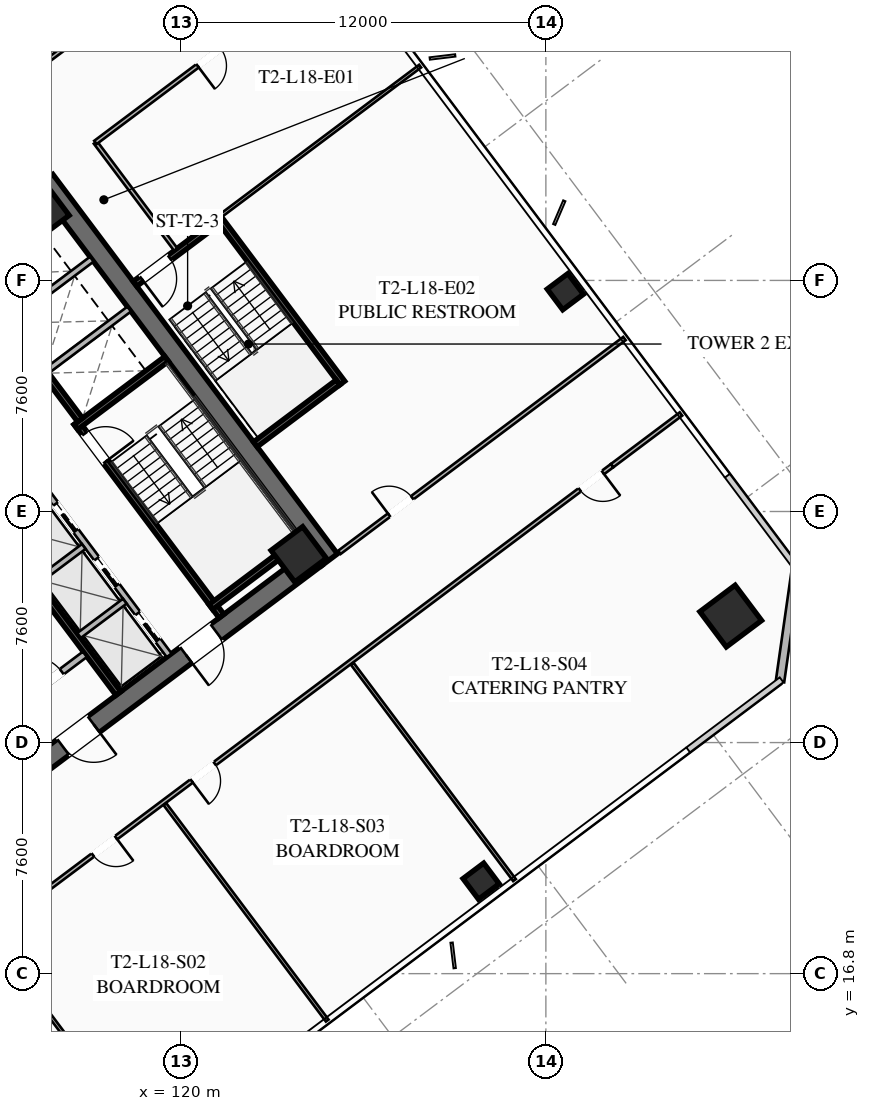
"""IFC4 building model, lengths in metres.
Left out: names, types, materials, properties, quantities, classifications, styles, units other than length and angle.
Written with IfcOpenShell. Run it as: python <this file> out.ifc"""

import sys

from ifc_helpers import new_model, si_unit, direction, frame, frame_2d, origin, origin_2d, place, context, subcontext, project, spatial, rectangle, hollow_rectangle, extrude, element, fill, save


model = new_model("IFC4")
c1 = context("Model", 3, precision=1e-05, world=origin(), true_north=direction((0.0, 1.0)))
c2 = subcontext(c1, "Body", "Model", "MODEL_VIEW")
j1 = project(units=[si_unit("LENGTHUNIT", "METRE"), si_unit("PLANEANGLEUNIT", "RADIAN")], contexts=[c1])
p1 = place(None, origin())
s1 = spatial("IfcSite", under=j1, at=p1, CompositionType="ELEMENT")
p2 = place(p1, origin())
s2 = spatial("IfcBuilding", under=s1, at=p2, CompositionType="ELEMENT")
p3 = place(p2, frame((0.0, 0.0, 70.75)))
s3 = spatial("IfcBuildingStorey", under=s2, at=p3, CompositionType="ELEMENT", Elevation=70.75)
p4 = place(p3, frame((115.524, 42.893, 0.0), z_axis=(0.0, 0.0, 1.0), x_axis=(0.600005007985, -0.799996243986, 0.0)))
e1 = element("IfcWall", 1, at=p4, inside=s3, PredefinedType="SHEAR", context=c2, shape_type="SweptSolid", body=[
    extrude(rectangle(XDim=15.6, YDim=0.65, at=frame_2d((7.8, 0.0))), origin(), (0.0, 0.0, 1.0), 3.55),
])
p5 = place(p3, frame((124.429, 30.478, 0.0), z_axis=(0.0, 0.0, 1.0), x_axis=(-0.799998028465, -0.600002628705, 0.0)))
e2 = element("IfcWall", 2, at=p5, inside=s3, PredefinedType="SHEAR", context=c2, shape_type="SweptSolid", body=[
    extrude(rectangle(XDim=14.86, YDim=0.65, at=frame_2d((7.43, 0.0))), origin(), (0.0, 0.0, 1.0), 3.55),
])
p6 = place(p5, frame((9.13, 0.0, 0.0)))
e3 = element("IfcOpeningElement", 3, at=p6, cuts=e2, PredefinedType="OPENING", context=c2, shape_type="SweptSolid", body=[
    extrude(rectangle(XDim=1.25, YDim=2.25, at=frame_2d((0.625, 1.125))), frame((0.0, 0.335, 0.0), z_axis=(0.0, -1.0, 0.0), x_axis=(1.0, 0.0, 0.0)), (0.0, 0.0, 1.0), 0.67),
])
p7 = place(p5, frame((4.08, 0.0, 0.0)))
e4 = element("IfcOpeningElement", 4, at=p7, cuts=e2, PredefinedType="OPENING", context=c2, shape_type="SweptSolid", body=[
    extrude(rectangle(XDim=1.25, YDim=2.25, at=frame_2d((0.625, 1.125))), frame((0.0, 0.335, 0.0), z_axis=(0.0, -1.0, 0.0), x_axis=(1.0, 0.0, 0.0)), (0.0, 0.0, 1.0), 0.67),
])
for number, where, z_axis, x_axis in (
    (5, (123.87, 30.59, 0.0), (0.0, 0.0, 1.0), (0.8, 0.6, 0.0)),
    (6, (115.41, 41.87, 0.0), (0.0, 0.0, 1.0), (0.8, 0.6, 0.0)),
):
    element("IfcColumn", number, at=place(p3, frame(where, z_axis=z_axis, x_axis=x_axis)), inside=s3, PredefinedType="COLUMN", context=c2, shape_type="SweptSolid", body=[
        extrude(hollow_rectangle(XDim=1.3, YDim=1.3, WallThickness=0.05, at=origin_2d()), origin(), (0.0, 0.0, 1.0), 3.35),
    ])
p8 = place(p3, frame((138.08, 28.56, 0.0), z_axis=(0.0, 0.0, 1.0), x_axis=(0.799999996291, 0.600000004945, 0.0)))
e7 = element("IfcColumn", 7, at=p8, inside=s3, PredefinedType="COLUMN", context=c2, shape_type="SweptSolid", body=[
    extrude(hollow_rectangle(XDim=1.45, YDim=1.45, WallThickness=0.055, at=origin_2d()), origin(), (0.0, 0.0, 1.0), 3.35),
])
for number, where, z_axis, x_axis in (
    (8, (129.87, 19.84, 0.0), (0.0, 0.0, 1.0), (0.8, 0.6, 0.0)),
    (9, (132.64, 39.23, 0.0), (0.0, 0.0, 1.0), (0.8, 0.6, 0.0)),
):
    element("IfcColumn", number, at=place(p3, frame(where, z_axis=z_axis, x_axis=x_axis)), inside=s3, PredefinedType="COLUMN", context=c2, shape_type="SweptSolid", body=[
        extrude(hollow_rectangle(XDim=0.85, YDim=0.85, WallThickness=0.035, at=origin_2d()), origin(), (0.0, 0.0, 1.0), 3.35),
    ])
p9 = place(p3, frame((140.24, 30.18, 0.0), z_axis=(0.0, 0.0, 1.0), x_axis=(-0.141430307517, -0.989948214866, 0.0)))
e10 = element("IfcWall", 10, at=p9, inside=s3, PredefinedType="SOLIDWALL", context=c2, shape_type="SweptSolid", body=[
    extrude(rectangle(XDim=3.818, YDim=0.28, at=frame_2d((1.909, 0.0))), origin(), (0.0, 0.0, 1.0), 3.35),
])
p10 = place(p3, frame((116.56, 34.92, 0.0), z_axis=(0.0, 0.0, 1.0), x_axis=(0.600009827119, -0.799992629566, 0.0)))
e11 = element("IfcWall", 11, at=p10, inside=s3, PredefinedType="SHEAR", context=c2, shape_type="SweptSolid", body=[
    extrude(rectangle(XDim=7.95, YDim=0.2, at=frame_2d((3.975, 0.0))), origin(), (0.0, 0.0, 1.0), 3.35),
])
p11 = place(p10, frame((0.45, 0.0, 0.0)))
e12 = element("IfcOpeningElement", 12, at=p11, cuts=e11, PredefinedType="OPENING", context=c2, shape_type="SweptSolid", body=[
    extrude(rectangle(XDim=1.15, YDim=2.2, at=frame_2d((0.575, 1.1))), frame((0.0, 0.11, 0.0), z_axis=(0.0, -1.0, 0.0), x_axis=(1.0, 0.0, 0.0)), (0.0, 0.0, 1.0), 0.22),
])
for number, where, z_axis, x_axis in (
    (13, (116.54, 34.78, 0.0), (0.0, 0.0, 1.0), (0.8, 0.6, 0.0)),
    (14, (120.98, 28.86, 0.0), (0.0, 0.0, 1.0), (0.8, 0.6, 0.0)),
):
    element("IfcWall", number, at=place(p3, frame(where, z_axis=z_axis, x_axis=x_axis)), inside=s3, PredefinedType="SHEAR", context=c2, shape_type="SweptSolid", body=[
        extrude(rectangle(XDim=3.73, YDim=0.2, at=frame_2d((1.865, 0.0))), origin(), (0.0, 0.0, 1.0), 3.35),
    ])
p12 = place(p3, frame((117.938, 26.016, 0.0), z_axis=(0.0, 0.0, 1.0), x_axis=(-0.600005463273, 0.799995902516, 0.0)))
e15 = element("IfcWall", 15, at=p12, inside=s3, PredefinedType="SHEAR", context=c2, shape_type="SweptSolid", body=[
    extrude(rectangle(XDim=14.3, YDim=0.2, at=frame_2d((7.15, 0.0))), origin(), (0.0, 0.0, 1.0), 3.35),
])
p13 = place(p3, frame((114.316, 25.412, 0.0), z_axis=(0.0, 0.0, 1.0), x_axis=(0.800018601094, 0.59997519774, 0.0)))
e16 = element("IfcWall", 16, at=p13, inside=s3, PredefinedType="SOLIDWALL", context=c2, shape_type="SweptSolid", body=[
    extrude(rectangle(XDim=3.15, YDim=0.22, at=frame_2d((1.575, 0.0))), origin(), (0.0, 0.0, 1.0), 2.703),
])
p14 = place(p13, frame((0.95, 0.0, 0.0)))
e17 = element("IfcOpeningElement", 17, at=p14, cuts=e16, PredefinedType="OPENING", context=c2, shape_type="SweptSolid", body=[
    extrude(rectangle(XDim=1.25, YDim=2.25, at=frame_2d((0.625, 1.125))), frame((0.0, 0.12, 0.0), z_axis=(0.0, -1.0, 0.0), x_axis=(1.0, 0.0, 0.0)), (0.0, 0.0, 1.0), 0.24),
])
p15 = place(p3, frame((112.87, 40.09, 0.0), z_axis=(0.0, 0.0, 1.0), x_axis=(0.599975393228, -0.800018454488, 0.0)))
e18 = element("IfcWall", 18, at=p15, inside=s3, PredefinedType="SHEAR", context=c2, shape_type="SweptSolid", body=[
    extrude(rectangle(XDim=6.35, YDim=0.2, at=frame_2d((3.175, 0.0))), origin(), (0.0, 0.0, 1.0), 3.35),
])
for number, where, z_axis, x_axis in (
    (19, (115.59, 36.63, 0.0), (0.0, 0.0, 1.0), (0.8, 0.6, 0.0)),
    (20, (114.36, 38.27, 0.0), (0.0, 0.0, 1.0), (0.8, 0.6, 0.0)),
):
    element("IfcWall", number, at=place(p3, frame(where, z_axis=z_axis, x_axis=x_axis)), inside=s3, PredefinedType="SOLIDWALL", context=c2, shape_type="SweptSolid", body=[
        extrude(rectangle(XDim=3.38, YDim=0.2, at=frame_2d((1.69, 0.0))), origin(), (0.0, 0.0, 1.0), 3.35),
    ])
p16 = place(p3, frame((119.61, 27.27, 0.0), z_axis=(0.0, 0.0, 1.0), x_axis=(-0.600011488909, 0.79999138319, 0.0)))
e21 = element("IfcWall", 21, at=p16, inside=s3, PredefinedType="SOLIDWALL", context=c2, shape_type="SweptSolid", body=[
    extrude(rectangle(XDim=6.8, YDim=0.2, at=frame_2d((3.4, 0.0))), origin(), (0.0, 0.0, 1.0), 3.35),
])
p17 = place(p16, frame((0.625, 0.0, 0.0)))
e22 = element("IfcOpeningElement", 22, at=p17, cuts=e21, PredefinedType="OPENING", context=c2, shape_type="SweptSolid", body=[
    extrude(rectangle(XDim=1.1, YDim=2.2, at=frame_2d((0.55, 1.1))), frame((0.0, 0.11, 0.0), z_axis=(0.0, -1.0, 0.0), x_axis=(1.0, 0.0, 0.0)), (0.0, 0.0, 1.0), 0.22),
])
p18 = place(p16, frame((2.875, 0.0, 0.0)))
e23 = element("IfcOpeningElement", 23, at=p18, cuts=e21, PredefinedType="OPENING", context=c2, shape_type="SweptSolid", body=[
    extrude(rectangle(XDim=1.1, YDim=2.2, at=frame_2d((0.55, 1.1))), frame((0.0, 0.11, 0.0), z_axis=(0.0, -1.0, 0.0), x_axis=(1.0, 0.0, 0.0)), (0.0, 0.0, 1.0), 0.22),
])
p19 = place(p16, frame((5.125, 0.0, 0.0)))
e24 = element("IfcOpeningElement", 24, at=p19, cuts=e21, PredefinedType="OPENING", context=c2, shape_type="SweptSolid", body=[
    extrude(rectangle(XDim=1.1, YDim=2.2, at=frame_2d((0.55, 1.1))), frame((0.0, 0.11, 0.0), z_axis=(0.0, -1.0, 0.0), x_axis=(1.0, 0.0, 0.0)), (0.0, 0.0, 1.0), 0.22),
])
p20 = place(p3, frame((116.646, 27.922, 0.0), z_axis=(0.0, 0.0, 1.0), x_axis=(0.8, 0.6, 0.0)))
e25 = element("IfcWall", 25, at=p20, inside=s3, PredefinedType="SOLIDWALL", context=c2, shape_type="SweptSolid", body=[
    extrude(rectangle(XDim=1.88, YDim=0.2, at=frame_2d((0.94, 0.0))), origin(), (0.0, 0.0, 1.0), 3.35),
])
p21 = place(p3, frame((115.296, 29.722, 0.0), z_axis=(0.0, 0.0, 1.0), x_axis=(0.799984418148, 0.600020775241, 0.0)))
e26 = element("IfcWall", 26, at=p21, inside=s3, PredefinedType="SOLIDWALL", context=c2, shape_type="SweptSolid", body=[
    extrude(rectangle(XDim=1.88, YDim=0.2, at=frame_2d((0.94, 0.0))), origin(), (0.0, 0.0, 1.0), 3.35),
])
p22 = place(p3, frame((125.304, 36.228, 0.0), z_axis=(0.0, 0.0, 1.0), x_axis=(-0.59998851072, 0.800008616831, 0.0)))
e27 = element("IfcWall", 27, at=p22, inside=s3, PredefinedType="SHEAR", context=c2, shape_type="SweptSolid", body=[
    extrude(rectangle(XDim=6.8, YDim=0.2, at=frame_2d((3.4, 0.0))), origin(), (0.0, 0.0, 1.0), 3.35),
])
p23 = place(p3, frame((121.204, 41.528, 0.0), z_axis=(0.0, 0.0, 1.0), x_axis=(-0.800017232136, -0.599977023131, 0.0)))
e28 = element("IfcWall", 28, at=p23, inside=s3, PredefinedType="SHEAR", context=c2, shape_type="SweptSolid", body=[
    extrude(rectangle(XDim=3.4, YDim=0.2, at=frame_2d((1.7, 0.0))), origin(), (0.0, 0.0, 1.0), 3.35),
])
p24 = place(p23, frame((1.975, 0.0, 0.0)))
e29 = element("IfcOpeningElement", 29, at=p24, cuts=e28, PredefinedType="OPENING", context=c2, shape_type="SweptSolid", body=[
    extrude(rectangle(XDim=1.15, YDim=2.2, at=frame_2d((0.575, 1.1))), frame((0.0, 0.11, 0.0), z_axis=(0.0, -1.0, 0.0), x_axis=(1.0, 0.0, 0.0)), (0.0, 0.0, 1.0), 0.22),
])
p25 = place(p3, frame((122.444, 34.208, 0.0), z_axis=(0.0, 0.0, 1.0), x_axis=(0.79999138319, 0.600011488909, 0.0)))
e30 = element("IfcWall", 30, at=p25, inside=s3, PredefinedType="SHEAR", context=c2, shape_type="SweptSolid", body=[
    extrude(rectangle(XDim=3.4, YDim=0.2, at=frame_2d((1.7, 0.0))), origin(), (0.0, 0.0, 1.0), 3.35),
])
p26 = place(p3, frame((119.824, 40.618, 0.0), z_axis=(0.0, 0.0, 1.0), x_axis=(-0.599982243973, 0.800013316712, 0.0)))
e31 = element("IfcWall", 31, at=p26, inside=s3, PredefinedType="PARTITIONING", context=c2, shape_type="SweptSolid", body=[
    extrude(rectangle(XDim=4.4, YDim=0.135, at=frame_2d((2.2, 0.0))), origin(), (0.0, 0.0, 1.0), 2.703),
])
p27 = place(p3, frame((98.516, 34.012, 0.0), z_axis=(0.0, 0.0, 1.0), x_axis=(0.8, 0.6, 0.0)))
e32 = element("IfcWall", 32, at=p27, inside=s3, PredefinedType="PARTITIONING", context=c2, shape_type="SweptSolid", body=[
    extrude(rectangle(XDim=28.23, YDim=0.135, at=frame_2d((14.115, 0.0))), origin(), (0.0, 0.0, 1.0), 2.703),
])
p28 = place(p27, frame((0.3, 0.0, 0.0)))
e33 = element("IfcOpeningElement", 33, at=p28, cuts=e32, PredefinedType="OPENING", context=c2, shape_type="SweptSolid", body=[
    extrude(rectangle(XDim=0.95, YDim=2.05, at=frame_2d((0.475, 1.025))), frame((0.0, 0.077, 0.0), z_axis=(0.0, -1.0, 0.0), x_axis=(1.0, 0.0, 0.0)), (0.0, 0.0, 1.0), 0.155),
])
p29 = place(p27, frame((6.84, 0.0, 0.0)))
e34 = element("IfcOpeningElement", 34, at=p29, cuts=e32, PredefinedType="OPENING", context=c2, shape_type="SweptSolid", body=[
    extrude(rectangle(XDim=0.95, YDim=2.05, at=frame_2d((0.475, 1.025))), frame((0.0, 0.077, 0.0), z_axis=(0.0, -1.0, 0.0), x_axis=(1.0, 0.0, 0.0)), (0.0, 0.0, 1.0), 0.155),
])
p30 = place(p27, frame((10.863, 0.0, 0.0)))
e35 = element("IfcOpeningElement", 35, at=p30, cuts=e32, PredefinedType="OPENING", context=c2, shape_type="SweptSolid", body=[
    extrude(rectangle(XDim=0.95, YDim=2.05, at=frame_2d((0.475, 1.025))), frame((0.0, 0.077, 0.0), z_axis=(0.0, -1.0, 0.0), x_axis=(1.0, 0.0, 0.0)), (0.0, 0.0, 1.0), 0.155),
])
p31 = place(p27, frame((26.98, 0.0, 0.0)))
e36 = element("IfcOpeningElement", 36, at=p31, cuts=e32, PredefinedType="OPENING", context=c2, shape_type="SweptSolid", body=[
    extrude(rectangle(XDim=0.95, YDim=2.05, at=frame_2d((0.475, 1.025))), frame((0.0, 0.077, 0.0), z_axis=(0.0, -1.0, 0.0), x_axis=(1.0, 0.0, 0.0)), (0.0, 0.0, 1.0), 0.155),
])
p32 = place(p3, frame((134.18, 33.51, 0.0), z_axis=(0.0, 0.0, 1.0), x_axis=(-0.8, -0.6, 0.0)))
e37 = element("IfcWall", 37, at=p32, inside=s3, PredefinedType="PARTITIONING", context=c2, shape_type="SweptSolid", body=[
    extrude(rectangle(XDim=28.23, YDim=0.135, at=frame_2d((14.115, 0.0))), origin(), (0.0, 0.0, 1.0), 2.703),
])
p33 = place(p32, frame((26.9, 0.0, 0.0)))
e38 = element("IfcOpeningElement", 38, at=p33, cuts=e37, PredefinedType="OPENING", context=c2, shape_type="SweptSolid", body=[
    extrude(rectangle(XDim=0.95, YDim=2.05, at=frame_2d((0.475, 1.025))), frame((0.0, 0.077, 0.0), z_axis=(0.0, -1.0, 0.0), x_axis=(1.0, 0.0, 0.0)), (0.0, 0.0, 1.0), 0.155),
])
p34 = place(p32, frame((20.399, 0.0, 0.0)))
e39 = element("IfcOpeningElement", 39, at=p34, cuts=e37, PredefinedType="OPENING", context=c2, shape_type="SweptSolid", body=[
    extrude(rectangle(XDim=0.95, YDim=2.05, at=frame_2d((0.475, 1.025))), frame((0.0, 0.077, 0.0), z_axis=(0.0, -1.0, 0.0), x_axis=(1.0, 0.0, 0.0)), (0.0, 0.0, 1.0), 0.155),
])
p35 = place(p32, frame((16.339, 0.0, 0.0)))
e40 = element("IfcOpeningElement", 40, at=p35, cuts=e37, PredefinedType="OPENING", context=c2, shape_type="SweptSolid", body=[
    extrude(rectangle(XDim=0.95, YDim=2.05, at=frame_2d((0.475, 1.025))), frame((0.0, 0.077, 0.0), z_axis=(0.0, -1.0, 0.0), x_axis=(1.0, 0.0, 0.0)), (0.0, 0.0, 1.0), 0.155),
])
p36 = place(p32, frame((0.38, 0.0, 0.0)))
e41 = element("IfcOpeningElement", 41, at=p36, cuts=e37, PredefinedType="OPENING", context=c2, shape_type="SweptSolid", body=[
    extrude(rectangle(XDim=0.95, YDim=2.05, at=frame_2d((0.475, 1.025))), frame((0.0, 0.077, 0.0), z_axis=(0.0, -1.0, 0.0), x_axis=(1.0, 0.0, 0.0)), (0.0, 0.0, 1.0), 0.155),
])
p37 = place(p3, frame((134.18, 33.51, 0.0), z_axis=(0.0, 0.0, 1.0), x_axis=(0.8000207031, 0.599972394874, 0.0)))
e42 = element("IfcWall", 42, at=p37, inside=s3, PredefinedType="PARTITIONING", context=c2, shape_type="SweptSolid", body=[
    extrude(rectangle(XDim=2.83, YDim=0.135, at=frame_2d((1.415, 0.0))), origin(), (0.0, 0.0, 1.0), 2.703),
])
for number, where, z_axis, x_axis in (
    (43, (119.048, 10.936, 0.0), (0.0, 0.0, 1.0), (-0.6, 0.8, 0.0)),
    (44, (124.808, 15.256, 0.0), (0.0, 0.0, 1.0), (-0.6, 0.8, 0.0)),
):
    element("IfcWall", number, at=place(p3, frame(where, z_axis=z_axis, x_axis=x_axis)), inside=s3, PredefinedType="PARTITIONING", context=c2, shape_type="SweptSolid", body=[
        extrude(rectangle(XDim=8.9, YDim=0.11, at=frame_2d((4.45, 0.0))), origin(), (0.0, 0.0, 1.0), 2.703),
    ])
p38 = place(p3, frame((130.968, 19.876, 0.0), z_axis=(0.0, 0.0, 1.0), x_axis=(-0.6, 0.8, 0.0)))
e45 = element("IfcWall", 45, at=p38, inside=s3, PredefinedType="PARTITIONING", context=c2, shape_type="SweptSolid", body=[
    extrude(rectangle(XDim=8.9, YDim=0.11, at=frame_2d((4.45, 0.0))), origin(), (0.0, 0.0, 1.0), 2.703),
])
p39 = place(p3, frame((125.224, 50.168, 0.0), z_axis=(0.0, 0.0, 1.0), x_axis=(-0.8, -0.6, 0.0)))
e46 = element("IfcWall", 46, at=p39, inside=s3, PredefinedType="PARTITIONING", context=c2, shape_type="SweptSolid", body=[
    extrude(rectangle(XDim=10.05, YDim=0.135, at=frame_2d((5.025, 0.0))), origin(), (0.0, 0.0, 1.0), 2.703),
])
p40 = place(p39, frame((4.9, 0.0, 0.0)))
e47 = element("IfcOpeningElement", 47, at=p40, cuts=e46, PredefinedType="OPENING", context=c2, shape_type="SweptSolid", body=[
    extrude(rectangle(XDim=0.95, YDim=2.05, at=frame_2d((0.475, 1.025))), frame((0.0, 0.077, 0.0), z_axis=(0.0, -1.0, 0.0), x_axis=(1.0, 0.0, 0.0)), (0.0, 0.0, 1.0), 0.155),
])
p41 = place(p3, frame((125.208, 30.656, 0.0), z_axis=(0.0, 0.0, 1.0), x_axis=(0.8, 0.6, 0.0)))
e48 = element("IfcWall", 48, at=p41, inside=s3, PredefinedType="PARTITIONING", context=c2, shape_type="SweptSolid", body=[
    extrude(rectangle(XDim=11.72, YDim=0.135, at=frame_2d((5.86, 0.0))), origin(), (0.0, 0.0, 1.0), 2.703),
])
p42 = place(p41, frame((2.045, 0.0, 0.0)))
e49 = element("IfcOpeningElement", 49, at=p42, cuts=e48, PredefinedType="OPENING", context=c2, shape_type="SweptSolid", body=[
    extrude(rectangle(XDim=0.95, YDim=2.05, at=frame_2d((0.475, 1.025))), frame((0.0, 0.077, 0.0), z_axis=(0.0, -1.0, 0.0), x_axis=(1.0, 0.0, 0.0)), (0.0, 0.0, 1.0), 0.155),
])
p43 = place(p3, frame((127.864, 46.648, 0.0), z_axis=(0.0, 0.0, 1.0), x_axis=(-0.800007145523, -0.599990472518, 0.0)))
e50 = element("IfcWall", 50, at=p43, inside=s3, PredefinedType="PARTITIONING", context=c2, shape_type="SweptSolid", body=[
    extrude(rectangle(XDim=8.2, YDim=0.11, at=frame_2d((4.1, 0.0))), origin(), (0.0, 0.0, 1.0), 2.703),
])
p44 = place(p6, origin())
e51 = element("IfcDoor", 51, at=p44, inside=s3, OperationType="SINGLE_SWING_LEFT", PredefinedType="DOOR", context=c2, shape_type="SweptSolid", body=[
    extrude(rectangle(XDim=1.25, YDim=2.25, at=frame_2d((0.625, 1.125))), frame((0.0, 0.025, 0.0), z_axis=(0.0, -1.0, 0.0), x_axis=(1.0, 0.0, 0.0)), (0.0, 0.0, 1.0), 0.05),
])
fill(e3, e51)
p45 = place(p7, origin())
e52 = element("IfcDoor", 52, at=p45, inside=s3, OperationType="SINGLE_SWING_RIGHT", PredefinedType="DOOR", context=c2, shape_type="SweptSolid", body=[
    extrude(rectangle(XDim=1.25, YDim=2.25, at=frame_2d((0.625, 1.125))), frame((0.0, 0.025, 0.0), z_axis=(0.0, -1.0, 0.0), x_axis=(1.0, 0.0, 0.0)), (0.0, 0.0, 1.0), 0.05),
])
fill(e4, e52)
p46 = place(p11, origin())
e53 = element("IfcDoor", 53, at=p46, inside=s3, OperationType="SINGLE_SWING_RIGHT", PredefinedType="DOOR", context=c2, shape_type="SweptSolid", body=[
    extrude(rectangle(XDim=1.15, YDim=2.2, at=frame_2d((0.575, 1.1))), frame((0.0, 0.025, 0.0), z_axis=(0.0, -1.0, 0.0), x_axis=(1.0, 0.0, 0.0)), (0.0, 0.0, 1.0), 0.05),
])
fill(e12, e53)
p47 = place(p14, origin())
e54 = element("IfcDoor", 54, at=p47, inside=s3, OperationType="SINGLE_SWING_LEFT", PredefinedType="DOOR", context=c2, shape_type="SweptSolid", body=[
    extrude(rectangle(XDim=1.25, YDim=2.25, at=frame_2d((0.625, 1.125))), frame((0.0, 0.025, 0.0), z_axis=(0.0, -1.0, 0.0), x_axis=(1.0, 0.0, 0.0)), (0.0, 0.0, 1.0), 0.05),
])
fill(e17, e54)
p48 = place(p24, origin())
e55 = element("IfcDoor", 55, at=p48, inside=s3, OperationType="SINGLE_SWING_RIGHT", PredefinedType="DOOR", context=c2, shape_type="SweptSolid", body=[
    extrude(rectangle(XDim=1.15, YDim=2.2, at=frame_2d((0.575, 1.1))), frame((0.0, 0.025, 0.0), z_axis=(0.0, -1.0, 0.0), x_axis=(1.0, 0.0, 0.0)), (0.0, 0.0, 1.0), 0.05),
])
fill(e29, e55)
p49 = place(p34, origin())
e56 = element("IfcDoor", 56, at=p49, inside=s3, OperationType="SINGLE_SWING_LEFT", PredefinedType="DOOR", context=c2, shape_type="SweptSolid", body=[
    extrude(rectangle(XDim=0.95, YDim=2.05, at=frame_2d((0.475, 1.025))), frame((0.0, 0.025, 0.0), z_axis=(0.0, -1.0, 0.0), x_axis=(1.0, 0.0, 0.0)), (0.0, 0.0, 1.0), 0.05),
])
fill(e39, e56)
p50 = place(p35, origin())
e57 = element("IfcDoor", 57, at=p50, inside=s3, OperationType="SINGLE_SWING_RIGHT", PredefinedType="DOOR", context=c2, shape_type="SweptSolid", body=[
    extrude(rectangle(XDim=0.95, YDim=2.05, at=frame_2d((0.475, 1.025))), frame((0.0, 0.025, 0.0), z_axis=(0.0, -1.0, 0.0), x_axis=(1.0, 0.0, 0.0)), (0.0, 0.0, 1.0), 0.05),
])
fill(e40, e57)
p51 = place(p36, origin())
e58 = element("IfcDoor", 58, at=p51, inside=s3, OperationType="SINGLE_SWING_LEFT", PredefinedType="DOOR", context=c2, shape_type="SweptSolid", body=[
    extrude(rectangle(XDim=0.95, YDim=2.05, at=frame_2d((0.475, 1.025))), frame((0.0, 0.025, 0.0), z_axis=(0.0, -1.0, 0.0), x_axis=(1.0, 0.0, 0.0)), (0.0, 0.0, 1.0), 0.05),
])
fill(e41, e58)
p52 = place(p40, origin())
e59 = element("IfcDoor", 59, at=p52, inside=s3, OperationType="SINGLE_SWING_RIGHT", PredefinedType="DOOR", context=c2, shape_type="SweptSolid", body=[
    extrude(rectangle(XDim=0.95, YDim=2.05, at=frame_2d((0.475, 1.025))), frame((0.0, 0.025, 0.0), z_axis=(0.0, -1.0, 0.0), x_axis=(1.0, 0.0, 0.0)), (0.0, 0.0, 1.0), 0.05),
])
fill(e47, e59)
p53 = place(p42, origin())
e60 = element("IfcDoor", 60, at=p53, inside=s3, OperationType="SINGLE_SWING_LEFT", PredefinedType="DOOR", context=c2, shape_type="SweptSolid", body=[
    extrude(rectangle(XDim=0.95, YDim=2.05, at=frame_2d((0.475, 1.025))), frame((0.0, 0.025, 0.0), z_axis=(0.0, -1.0, 0.0), x_axis=(1.0, 0.0, 0.0)), (0.0, 0.0, 1.0), 0.05),
])
fill(e49, e60)
p54 = place(p17, origin())
e61 = element("IfcDoor", 61, at=p54, inside=s3, OperationType="SLIDING_TO_LEFT", PredefinedType="DOOR", context=c2, shape_type="SweptSolid", body=[
    extrude(rectangle(XDim=1.1, YDim=2.2, at=frame_2d((0.55, 1.1))), frame((0.0, 0.025, 0.0), z_axis=(0.0, -1.0, 0.0), x_axis=(1.0, 0.0, 0.0)), (0.0, 0.0, 1.0), 0.05),
])
fill(e22, e61)
p55 = place(p18, origin())
e62 = element("IfcDoor", 62, at=p55, inside=s3, OperationType="SLIDING_TO_LEFT", PredefinedType="DOOR", context=c2, shape_type="SweptSolid", body=[
    extrude(rectangle(XDim=1.1, YDim=2.2, at=frame_2d((0.55, 1.1))), frame((0.0, 0.025, 0.0), z_axis=(0.0, -1.0, 0.0), x_axis=(1.0, 0.0, 0.0)), (0.0, 0.0, 1.0), 0.05),
])
fill(e23, e62)
p56 = place(p19, origin())
e63 = element("IfcDoor", 63, at=p56, inside=s3, OperationType="SLIDING_TO_LEFT", PredefinedType="DOOR", context=c2, shape_type="SweptSolid", body=[
    extrude(rectangle(XDim=1.1, YDim=2.2, at=frame_2d((0.55, 1.1))), frame((0.0, 0.025, 0.0), z_axis=(0.0, -1.0, 0.0), x_axis=(1.0, 0.0, 0.0)), (0.0, 0.0, 1.0), 0.05),
])
fill(e24, e63)
save(model, sys.argv[1])
